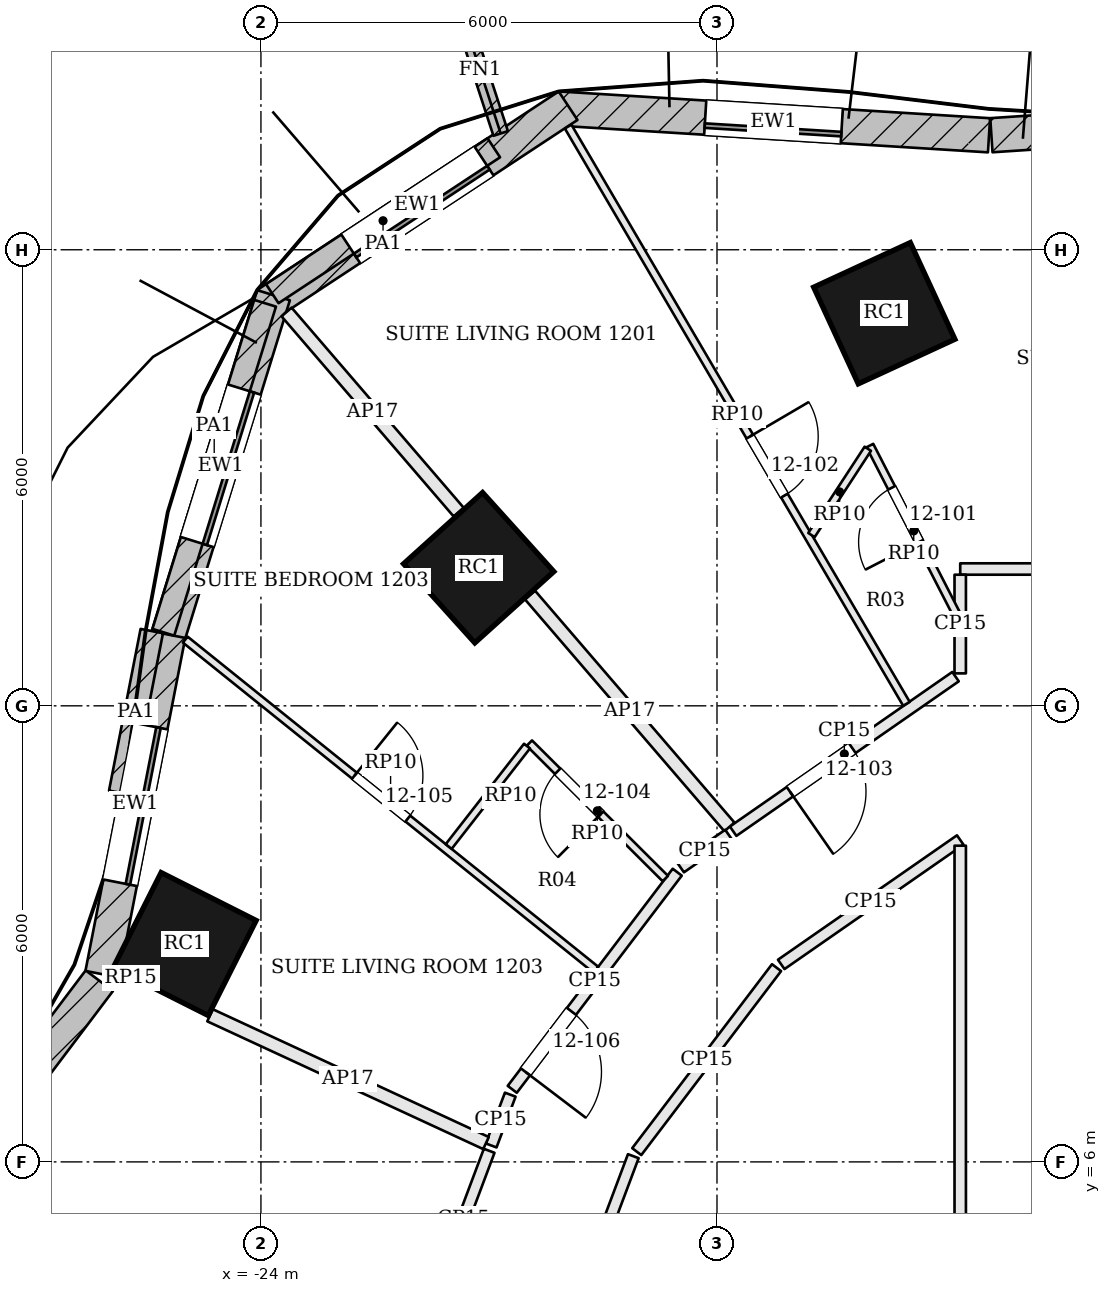
"""IFC4 building model, lengths in metres.
Left out: names, types, materials, properties, quantities, classifications, styles, units other than length and angle.
Written with IfcOpenShell. Run it as: python <this file> out.ifc"""

import sys

from ifc_helpers import new_model, si_unit, direction, frame, frame_2d, origin, origin_2d, place, context, subcontext, project, spatial, rectangle, extrude, element, fill, save


model = new_model("IFC4")
c1 = context("Model", 3, precision=1e-05, world=origin(), true_north=direction((0.0, 1.0)))
c2 = subcontext(c1, "Body", "Model", "MODEL_VIEW")
j1 = project(units=[si_unit("LENGTHUNIT", "METRE"), si_unit("PLANEANGLEUNIT", "RADIAN")], contexts=[c1])
p1 = place(None, origin())
s1 = spatial("IfcSite", under=j1, at=p1, CompositionType="ELEMENT")
p2 = place(p1, origin())
s2 = spatial("IfcBuilding", under=s1, at=p2, CompositionType="ELEMENT")
p3 = place(p2, frame((0.0, 0.0, 59.1)))
s3 = spatial("IfcBuildingStorey", under=s2, at=p3, CompositionType="ELEMENT", Elevation=59.1)
for number, where, z_axis, x_axis in (
    (1, (-15.799, 17.165, 0.0), (0.0, 0.0, 1.0), (-0.908, -0.419, 0.0)),
    (2, (-21.135, 13.817, 0.0), (0.0, 0.0, 1.0), (-0.743, -0.67, 0.0)),
    (3, (-25.003, 8.866, 0.0), (0.0, 0.0, 1.0), (-0.45, -0.893, 0.0)),
):
    element("IfcColumn", number, at=place(p3, frame(where, z_axis=z_axis, x_axis=x_axis)), inside=s3, PredefinedType="COLUMN", context=c2, shape_type="SweptSolid", body=[
        extrude(rectangle(XDim=1.4, YDim=1.4, at=origin_2d()), origin(), (0.0, 0.0, 1.0), 3.6),
    ])
p4 = place(p3, frame((-10.537, 19.761, 0.0), z_axis=(0.0, 0.0, 1.0), x_axis=(-0.997831357874, -0.065822346084, 0.0)))
e4 = element("IfcWall", 4, at=p4, inside=s3, PredefinedType="SOLIDWALL", context=c2, shape_type="SweptSolid", body=[
    extrude(rectangle(XDim=3.861, YDim=0.45, at=frame_2d((1.931, 0.0))), origin(), (0.0, 0.0, 1.0), 3.4),
])
p5 = place(p4, frame((0.881, 0.0, 0.9)))
e5 = element("IfcOpeningElement", 5, at=p5, cuts=e4, PredefinedType="OPENING", context=c2, shape_type="SweptSolid", body=[
    extrude(rectangle(XDim=2.1, YDim=2.0, at=frame_2d((1.05, 1.0))), frame((0.0, 0.235, 0.0), z_axis=(0.0, -1.0, 0.0), x_axis=(1.0, 0.0, 0.0)), (0.0, 0.0, 1.0), 0.47),
])
p6 = place(p3, frame((-14.421, 19.506, 0.0), z_axis=(0.0, 0.0, 1.0), x_axis=(-0.998078573447, 0.06196096534, 0.0)))
e6 = element("IfcWall", 6, at=p6, inside=s3, PredefinedType="SOLIDWALL", context=c2, shape_type="SweptSolid", body=[
    extrude(rectangle(XDim=5.682, YDim=0.45, at=frame_2d((2.841, 0.0))), origin(), (0.0, 0.0, 1.0), 3.4),
])
p7 = place(p6, frame((1.941, 0.0, 0.9)))
e7 = element("IfcOpeningElement", 7, at=p7, cuts=e6, PredefinedType="OPENING", context=c2, shape_type="SweptSolid", body=[
    extrude(rectangle(XDim=1.8, YDim=2.0, at=frame_2d((0.9, 1.0))), frame((0.0, 0.235, 0.0), z_axis=(0.0, -1.0, 0.0), x_axis=(1.0, 0.0, 0.0)), (0.0, 0.0, 1.0), 0.47),
])
p8 = place(p3, frame((-19.959, 19.895, 0.0), z_axis=(0.0, 0.0, 1.0), x_axis=(-0.835201398752, -0.549944200372, 0.0)))
e8 = element("IfcWall", 8, at=p8, inside=s3, PredefinedType="SOLIDWALL", context=c2, shape_type="SweptSolid", body=[
    extrude(rectangle(XDim=4.748, YDim=0.45, at=frame_2d((2.374, 0.0))), origin(), (0.0, 0.0, 1.0), 3.4),
])
p9 = place(p8, frame((1.324, 0.0, 0.9)))
e9 = element("IfcOpeningElement", 9, at=p9, cuts=e8, PredefinedType="OPENING", context=c2, shape_type="SweptSolid", body=[
    extrude(rectangle(XDim=2.1, YDim=2.0, at=frame_2d((1.05, 1.0))), frame((0.0, 0.235, 0.0), z_axis=(0.0, -1.0, 0.0), x_axis=(1.0, 0.0, 0.0)), (0.0, 0.0, 1.0), 0.47),
])
p10 = place(p3, frame((-23.834, 17.402, 0.0), z_axis=(0.0, 0.0, 1.0), x_axis=(-0.2954658114, -0.955353313855, 0.0)))
e10 = element("IfcWall", 10, at=p10, inside=s3, PredefinedType="SOLIDWALL", context=c2, shape_type="SweptSolid", body=[
    extrude(rectangle(XDim=4.698, YDim=0.45, at=frame_2d((2.349, 0.0))), origin(), (0.0, 0.0, 1.0), 3.4),
])
p11 = place(p10, frame((1.299, 0.0, 0.9)))
e11 = element("IfcOpeningElement", 11, at=p11, cuts=e10, PredefinedType="OPENING", context=c2, shape_type="SweptSolid", body=[
    extrude(rectangle(XDim=2.1, YDim=2.0, at=frame_2d((1.05, 1.0))), frame((0.0, 0.235, 0.0), z_axis=(0.0, -1.0, 0.0), x_axis=(1.0, 0.0, 0.0)), (0.0, 0.0, 1.0), 0.47),
])
p12 = place(p3, frame((-25.216, 12.936, 0.0), z_axis=(0.0, 0.0, 1.0), x_axis=(-0.191564556994, -0.981480015336, 0.0)))
e12 = element("IfcWall", 12, at=p12, inside=s3, PredefinedType="SOLIDWALL", context=c2, shape_type="SweptSolid", body=[
    extrude(rectangle(XDim=4.551, YDim=0.45, at=frame_2d((2.275, 0.0))), origin(), (0.0, 0.0, 1.0), 3.4),
])
p13 = place(p12, frame((1.226, 0.0, 0.9)))
e13 = element("IfcOpeningElement", 13, at=p13, cuts=e12, PredefinedType="OPENING", context=c2, shape_type="SweptSolid", body=[
    extrude(rectangle(XDim=2.1, YDim=2.0, at=frame_2d((1.05, 1.0))), frame((0.0, 0.235, 0.0), z_axis=(0.0, -1.0, 0.0), x_axis=(1.0, 0.0, 0.0)), (0.0, 0.0, 1.0), 0.47),
])
p14 = place(p3, frame((-26.126, 8.384, 0.0), z_axis=(0.0, 0.0, 1.0), x_axis=(-0.602408101465, -0.798188248028, 0.0)))
e14 = element("IfcWall", 14, at=p14, inside=s3, PredefinedType="SOLIDWALL", context=c2, shape_type="SweptSolid", body=[
    extrude(rectangle(XDim=4.909, YDim=0.45, at=frame_2d((2.455, 0.0))), origin(), (0.0, 0.0, 1.0), 3.4),
])
p15 = place(p14, frame((1.405, 0.0, 0.9)))
e15 = element("IfcOpeningElement", 15, at=p15, cuts=e14, PredefinedType="OPENING", context=c2, shape_type="SweptSolid", body=[
    extrude(rectangle(XDim=2.1, YDim=2.0, at=frame_2d((1.05, 1.0))), frame((0.0, 0.235, 0.0), z_axis=(0.0, -1.0, 0.0), x_axis=(1.0, 0.0, 0.0)), (0.0, 0.0, 1.0), 0.47),
])
p16 = place(p3, frame((-20.846, 19.53, 0.0), z_axis=(0.0, 0.0, 1.0), x_axis=(-0.309732726603, 0.950823662974, 0.0)))
e16 = element("IfcWall", 16, at=p16, inside=s3, PredefinedType="SOLIDWALL", context=c2, shape_type="SweptSolid", body=[
    extrude(rectangle(XDim=1.75, YDim=0.2, at=frame_2d((0.875, 0.0))), origin(), (0.0, 0.0, 1.0), 3.4),
])
p17 = place(p3, frame((-20.936, 19.342, 3.6), z_axis=(0.0, 0.0, 1.0), x_axis=(-0.835169297141, -0.549992950057, 0.0)))
e17 = element("IfcWall", 17, at=p17, inside=s3, PredefinedType="PARAPET", context=c2, shape_type="SweptSolid", body=[
    extrude(rectangle(XDim=3.49, YDim=0.3, at=frame_2d((1.745, 0.0))), origin(), (0.0, 0.0, 1.0), 1.1),
])
p18 = place(p3, frame((-23.945, 17.296, 3.6), z_axis=(0.0, 0.0, 1.0), x_axis=(-0.29546008929, -0.955355083535, 0.0)))
e18 = element("IfcWall", 18, at=p18, inside=s3, PredefinedType="PARAPET", context=c2, shape_type="SweptSolid", body=[
    extrude(rectangle(XDim=4.531, YDim=0.3, at=frame_2d((2.265, 0.0))), origin(), (0.0, 0.0, 1.0), 1.1),
])
p19 = place(p3, frame((-25.436, 12.983, 3.6), z_axis=(0.0, 0.0, 1.0), x_axis=(-0.191565926717, -0.981479747993, 0.0)))
e19 = element("IfcWall", 19, at=p19, inside=s3, PredefinedType="PARAPET", context=c2, shape_type="SweptSolid", body=[
    extrude(rectangle(XDim=2.168, YDim=0.3, at=frame_2d((1.084, 0.0))), origin(), (0.0, 0.0, 1.0), 1.1),
])
p20 = place(p3, frame((-11.464, 13.8, 0.0), z_axis=(0.0, 0.0, 1.0), x_axis=(-1.0, 0.0, 0.0)))
e20 = element("IfcWall", 20, at=p20, inside=s3, PredefinedType="PARTITIONING", context=c2, shape_type="SweptSolid", body=[
    extrude(rectangle(XDim=3.336, YDim=0.15, at=frame_2d((1.668, 0.0))), origin(), (0.0, 0.0, 1.0), 2.68),
])
p21 = place(p3, frame((-14.8, 13.725, 0.0), z_axis=(0.0, 0.0, 1.0), x_axis=(-0.000188040613, -0.99999998232, 0.0)))
e21 = element("IfcWall", 21, at=p21, inside=s3, PredefinedType="PARTITIONING", context=c2, shape_type="SweptSolid", body=[
    extrude(rectangle(XDim=1.298, YDim=0.15, at=frame_2d((0.649, 0.0))), origin(), (0.0, 0.0, 1.0), 2.68),
])
p22 = place(p3, frame((-14.862, 12.384, 0.0), z_axis=(0.0, 0.0, 1.0), x_axis=(-0.821152323197, -0.570709087108, 0.0)))
e22 = element("IfcWall", 22, at=p22, inside=s3, PredefinedType="PARTITIONING", context=c2, shape_type="SweptSolid", body=[
    extrude(rectangle(XDim=3.563, YDim=0.15, at=frame_2d((1.781, 0.0))), origin(), (0.0, 0.0, 1.0), 2.68),
])
p23 = place(p22, frame((1.652, 0.0, 0.0)))
e23 = element("IfcOpeningElement", 23, at=p23, cuts=e22, PredefinedType="OPENING", context=c2, shape_type="SweptSolid", body=[
    extrude(rectangle(XDim=1.0, YDim=2.1, at=frame_2d((0.5, 1.05))), frame((0.0, 0.085, 0.0), z_axis=(0.0, -1.0, 0.0), x_axis=(1.0, 0.0, 0.0)), (0.0, 0.0, 1.0), 0.17),
])
p24 = place(p3, frame((-23.663, 17.181, 0.0), z_axis=(0.0, 0.0, 1.0), x_axis=(0.652099088508, -0.758133747282, 0.0)))
e24 = element("IfcWall", 24, at=p24, inside=s3, PredefinedType="PARTITIONING", context=c2, shape_type="SweptSolid", body=[
    extrude(rectangle(XDim=3.472, YDim=0.175, at=frame_2d((1.736, 0.0))), origin(), (0.0, 0.0, 1.0), 2.68),
])
p25 = place(p3, frame((-20.459, 13.457, 0.0), z_axis=(0.0, 0.0, 1.0), x_axis=(0.652095095558, -0.758137181748, 0.0)))
e25 = element("IfcWall", 25, at=p25, inside=s3, PredefinedType="PARTITIONING", context=c2, shape_type="SweptSolid", body=[
    extrude(rectangle(XDim=4.022, YDim=0.175, at=frame_2d((2.011, 0.0))), origin(), (0.0, 0.0, 1.0), 2.68),
])
p26 = place(p3, frame((-17.849, 10.308, 0.0), z_axis=(0.0, 0.0, 1.0), x_axis=(-0.821191323677, -0.570652968027, 0.0)))
e26 = element("IfcWall", 26, at=p26, inside=s3, PredefinedType="PARTITIONING", context=c2, shape_type="SweptSolid", body=[
    extrude(rectangle(XDim=0.765, YDim=0.15, at=frame_2d((0.382, 0.0))), origin(), (0.0, 0.0, 1.0), 2.68),
])
p27 = place(p3, frame((-18.523, 9.811, 0.0), z_axis=(0.0, 0.0, 1.0), x_axis=(-0.605040130963, -0.796194976073, 0.0)))
e27 = element("IfcWall", 27, at=p27, inside=s3, PredefinedType="PARTITIONING", context=c2, shape_type="SweptSolid", body=[
    extrude(rectangle(XDim=3.588, YDim=0.15, at=frame_2d((1.794, 0.0))), origin(), (0.0, 0.0, 1.0), 2.68),
])
p28 = place(p27, frame((2.3, 0.0, 0.0)))
e28 = element("IfcOpeningElement", 28, at=p28, cuts=e27, PredefinedType="OPENING", context=c2, shape_type="SweptSolid", body=[
    extrude(rectangle(XDim=1.0, YDim=2.1, at=frame_2d((0.5, 1.05))), frame((0.0, 0.085, 0.0), z_axis=(0.0, -1.0, 0.0), x_axis=(1.0, 0.0, 0.0)), (0.0, 0.0, 1.0), 0.17),
])
p29 = place(p3, frame((-20.72, 6.885, 0.0), z_axis=(0.0, 0.0, 1.0), x_axis=(-0.351610674972, -0.936146320425, 0.0)))
e29 = element("IfcWall", 29, at=p29, inside=s3, PredefinedType="PARTITIONING", context=c2, shape_type="SweptSolid", body=[
    extrude(rectangle(XDim=0.714, YDim=0.15, at=frame_2d((0.357, 0.0))), origin(), (0.0, 0.0, 1.0), 2.68),
])
p30 = place(p3, frame((-25.857, 8.479, 0.0), z_axis=(0.0, 0.0, 1.0), x_axis=(0.907339741323, -0.420398137265, 0.0)))
e30 = element("IfcWall", 30, at=p30, inside=s3, PredefinedType="PARTITIONING", context=c2, shape_type="SweptSolid", body=[
    extrude(rectangle(XDim=0.312, YDim=0.15, at=frame_2d((0.156, 0.0))), origin(), (0.0, 0.0, 1.0), 3.4),
])
p31 = place(p3, frame((-24.669, 7.929, 0.0), z_axis=(0.0, 0.0, 1.0), x_axis=(0.907438898331, -0.420184061807, 0.0)))
e31 = element("IfcWall", 31, at=p31, inside=s3, PredefinedType="PARTITIONING", context=c2, shape_type="SweptSolid", body=[
    extrude(rectangle(XDim=4.0, YDim=0.175, at=frame_2d((2.0, 0.0))), origin(), (0.0, 0.0, 1.0), 2.68),
])
p32 = place(p3, frame((-20.997, 6.146, 0.0), z_axis=(0.0, 0.0, 1.0), x_axis=(-0.35150189194, -0.936187171437, 0.0)))
e32 = element("IfcWall", 32, at=p32, inside=s3, PredefinedType="PARTITIONING", context=c2, shape_type="SweptSolid", body=[
    extrude(rectangle(XDim=1.909, YDim=0.15, at=frame_2d((0.954, 0.0))), origin(), (0.0, 0.0, 1.0), 2.68),
])
p33 = place(p3, frame((-19.884, 3.99, 0.0), z_axis=(0.0, 0.0, 1.0), x_axis=(0.351423736928, 0.936216511884, 0.0)))
e33 = element("IfcWall", 33, at=p33, inside=s3, PredefinedType="PARTITIONING", context=c2, shape_type="SweptSolid", body=[
    extrude(rectangle(XDim=2.227, YDim=0.15, at=frame_2d((1.114, 0.0))), origin(), (0.0, 0.0, 1.0), 2.68),
])
p34 = place(p3, frame((-19.056, 6.135, 0.0), z_axis=(0.0, 0.0, 1.0), x_axis=(0.604999774258, 0.796225642107, 0.0)))
e34 = element("IfcWall", 34, at=p34, inside=s3, PredefinedType="PARTITIONING", context=c2, shape_type="SweptSolid", body=[
    extrude(rectangle(XDim=3.04, YDim=0.15, at=frame_2d((1.52, 0.0))), origin(), (0.0, 0.0, 1.0), 2.68),
])
p35 = place(p3, frame((-17.155, 8.598, 0.0), z_axis=(0.0, 0.0, 1.0), x_axis=(0.821087350938, 0.570802559673, 0.0)))
e35 = element("IfcWall", 35, at=p35, inside=s3, PredefinedType="PARTITIONING", context=c2, shape_type="SweptSolid", body=[
    extrude(rectangle(XDim=2.868, YDim=0.15, at=frame_2d((1.434, 0.0))), origin(), (0.0, 0.0, 1.0), 2.68),
])
p36 = place(p3, frame((-14.8, 10.16, 0.0), z_axis=(0.0, 0.0, 1.0), x_axis=(0.0, -1.0, 0.0)))
e36 = element("IfcWall", 36, at=p36, inside=s3, PredefinedType="PARTITIONING", context=c2, shape_type="SweptSolid", body=[
    extrude(rectangle(XDim=14.96, YDim=0.15, at=frame_2d((7.48, 0.0))), origin(), (0.0, 0.0, 1.0), 2.68),
])
p37 = place(p36, frame((6.542, 0.0, 0.0)))
e37 = element("IfcOpeningElement", 37, at=p37, cuts=e36, PredefinedType="OPENING", context=c2, shape_type="SweptSolid", body=[
    extrude(rectangle(XDim=1.8, YDim=2.1, at=frame_2d((0.9, 1.05))), frame((0.0, 0.085, 0.0), z_axis=(0.0, -1.0, 0.0), x_axis=(1.0, 0.0, 0.0)), (0.0, 0.0, 1.0), 0.17),
])
p38 = place(p3, frame((-19.958, 19.62, 0.0), z_axis=(0.0, 0.0, 1.0), x_axis=(0.505625538269, -0.862753044069, 0.0)))
e38 = element("IfcWall", 38, at=p38, inside=s3, PredefinedType="PARTITIONING", context=c2, shape_type="SweptSolid", body=[
    extrude(rectangle(XDim=8.802, YDim=0.1, at=frame_2d((4.401, 0.0))), origin(), (0.0, 0.0, 1.0), 2.898),
])
p39 = place(p38, frame((4.727, 0.0, 0.0)))
e39 = element("IfcOpeningElement", 39, at=p39, cuts=e38, PredefinedType="OPENING", context=c2, shape_type="SweptSolid", body=[
    extrude(rectangle(XDim=0.9, YDim=2.4, at=frame_2d((0.45, 1.2))), frame((0.0, 0.06, 0.0), z_axis=(0.0, -1.0, 0.0), x_axis=(1.0, 0.0, 0.0)), (0.0, 0.0, 1.0), 0.12),
])
p40 = place(p3, frame((-14.834, 13.178, 0.0), z_axis=(0.0, 0.0, 1.0), x_axis=(-0.457048681662, 0.889441680264, 0.0)))
e40 = element("IfcWall", 40, at=p40, inside=s3, PredefinedType="PARTITIONING", context=c2, shape_type="SweptSolid", body=[
    extrude(rectangle(XDim=2.525, YDim=0.1, at=frame_2d((1.262, 0.0))), origin(), (0.0, 0.0, 1.0), 2.898),
])
p41 = place(p40, frame((1.1, 0.0, 0.0)))
e41 = element("IfcOpeningElement", 41, at=p41, cuts=e40, PredefinedType="OPENING", context=c2, shape_type="SweptSolid", body=[
    extrude(rectangle(XDim=0.8, YDim=2.1, at=frame_2d((0.4, 1.05))), frame((0.0, 0.06, 0.0), z_axis=(0.0, -1.0, 0.0), x_axis=(1.0, 0.0, 0.0)), (0.0, 0.0, 1.0), 0.12),
])
p42 = place(p3, frame((-16.016, 15.382, 0.0), z_axis=(0.0, 0.0, 1.0), x_axis=(-0.546613733712, -0.837384873351, 0.0)))
e42 = element("IfcWall", 42, at=p42, inside=s3, PredefinedType="PARTITIONING", context=c2, shape_type="SweptSolid", body=[
    extrude(rectangle(XDim=1.356, YDim=0.1, at=frame_2d((0.678, 0.0))), origin(), (0.0, 0.0, 1.0), 2.898),
])
p43 = place(p3, frame((-24.996, 12.871, 0.0), z_axis=(0.0, 0.0, 1.0), x_axis=(0.779371961482, -0.626561525835, 0.0)))
e43 = element("IfcWall", 43, at=p43, inside=s3, PredefinedType="PARTITIONING", context=c2, shape_type="SweptSolid", body=[
    extrude(rectangle(XDim=6.932, YDim=0.1, at=frame_2d((3.466, 0.0))), origin(), (0.0, 0.0, 1.0), 2.898),
])
p44 = place(p43, frame((2.857, 0.0, 0.0)))
e44 = element("IfcOpeningElement", 44, at=p44, cuts=e43, PredefinedType="OPENING", context=c2, shape_type="SweptSolid", body=[
    extrude(rectangle(XDim=0.9, YDim=2.4, at=frame_2d((0.45, 1.2))), frame((0.0, 0.06, 0.0), z_axis=(0.0, -1.0, 0.0), x_axis=(1.0, 0.0, 0.0)), (0.0, 0.0, 1.0), 0.12),
])
p45 = place(p3, frame((-18.68, 9.728, 0.0), z_axis=(0.0, 0.0, 1.0), x_axis=(-0.708458982763, 0.705751988833, 0.0)))
e45 = element("IfcWall", 45, at=p45, inside=s3, PredefinedType="PARTITIONING", context=c2, shape_type="SweptSolid", body=[
    extrude(rectangle(XDim=2.525, YDim=0.1, at=frame_2d((1.263, 0.0))), origin(), (0.0, 0.0, 1.0), 2.898),
])
p46 = place(p45, frame((1.2, 0.0, 0.0)))
e46 = element("IfcOpeningElement", 46, at=p46, cuts=e45, PredefinedType="OPENING", context=c2, shape_type="SweptSolid", body=[
    extrude(rectangle(XDim=0.8, YDim=2.1, at=frame_2d((0.4, 1.05))), frame((0.0, 0.06, 0.0), z_axis=(0.0, -1.0, 0.0), x_axis=(1.0, 0.0, 0.0)), (0.0, 0.0, 1.0), 0.12),
])
p47 = place(p3, frame((-20.5, 11.47, 0.0), z_axis=(0.0, 0.0, 1.0), x_axis=(-0.614837929168, -0.788653485921, 0.0)))
e47 = element("IfcWall", 47, at=p47, inside=s3, PredefinedType="PARTITIONING", context=c2, shape_type="SweptSolid", body=[
    extrude(rectangle(XDim=1.676, YDim=0.1, at=frame_2d((0.838, 0.0))), origin(), (0.0, 0.0, 1.0), 2.898),
])
p48 = place(p7, origin())
e48 = element("IfcWindow", 48, at=p48, inside=s3, PartitioningType="SINGLE_PANEL", PredefinedType="WINDOW", context=c2, shape_type="SweptSolid", body=[
    extrude(rectangle(XDim=1.8, YDim=2.0, at=frame_2d((0.9, 1.0))), frame((0.0, 0.135, 0.0), z_axis=(0.0, -1.0, 0.0), x_axis=(1.0, 0.0, 0.0)), (0.0, 0.0, 1.0), 0.06),
])
fill(e7, e48)
p49 = place(p9, origin())
e49 = element("IfcWindow", 49, at=p49, inside=s3, PartitioningType="SINGLE_PANEL", PredefinedType="WINDOW", context=c2, shape_type="SweptSolid", body=[
    extrude(rectangle(XDim=2.1, YDim=2.0, at=frame_2d((1.05, 1.0))), frame((0.0, 0.135, 0.0), z_axis=(0.0, -1.0, 0.0), x_axis=(1.0, 0.0, 0.0)), (0.0, 0.0, 1.0), 0.06),
])
fill(e9, e49)
p50 = place(p11, origin())
e50 = element("IfcWindow", 50, at=p50, inside=s3, PartitioningType="SINGLE_PANEL", PredefinedType="WINDOW", context=c2, shape_type="SweptSolid", body=[
    extrude(rectangle(XDim=2.1, YDim=2.0, at=frame_2d((1.05, 1.0))), frame((0.0, 0.135, 0.0), z_axis=(0.0, -1.0, 0.0), x_axis=(1.0, 0.0, 0.0)), (0.0, 0.0, 1.0), 0.06),
])
fill(e11, e50)
p51 = place(p13, origin())
e51 = element("IfcWindow", 51, at=p51, inside=s3, PartitioningType="SINGLE_PANEL", PredefinedType="WINDOW", context=c2, shape_type="SweptSolid", body=[
    extrude(rectangle(XDim=2.1, YDim=2.0, at=frame_2d((1.05, 1.0))), frame((0.0, 0.135, 0.0), z_axis=(0.0, -1.0, 0.0), x_axis=(1.0, 0.0, 0.0)), (0.0, 0.0, 1.0), 0.06),
])
fill(e13, e51)
p52 = place(p41, origin())
e52 = element("IfcDoor", 52, at=p52, inside=s3, OperationType="SINGLE_SWING_LEFT", PredefinedType="DOOR", context=c2, shape_type="SweptSolid", body=[
    extrude(rectangle(XDim=0.8, YDim=2.1, at=frame_2d((0.4, 1.05))), frame((0.0, 0.025, 0.0), z_axis=(0.0, -1.0, 0.0), x_axis=(1.0, 0.0, 0.0)), (0.0, 0.0, 1.0), 0.05),
])
fill(e41, e52)
p53 = place(p39, origin())
e53 = element("IfcDoor", 53, at=p53, inside=s3, OperationType="SINGLE_SWING_LEFT", PredefinedType="DOOR", context=c2, shape_type="SweptSolid", body=[
    extrude(rectangle(XDim=0.9, YDim=2.4, at=frame_2d((0.45, 1.2))), frame((0.0, 0.025, 0.0), z_axis=(0.0, -1.0, 0.0), x_axis=(1.0, 0.0, 0.0)), (0.0, 0.0, 1.0), 0.05),
])
fill(e39, e53)
p54 = place(p23, origin())
e54 = element("IfcDoor", 54, at=p54, inside=s3, OperationType="SINGLE_SWING_RIGHT", PredefinedType="DOOR", context=c2, shape_type="SweptSolid", body=[
    extrude(rectangle(XDim=1.0, YDim=2.1, at=frame_2d((0.5, 1.05))), frame((0.0, 0.025, 0.0), z_axis=(0.0, -1.0, 0.0), x_axis=(1.0, 0.0, 0.0)), (0.0, 0.0, 1.0), 0.05),
])
fill(e23, e54)
p55 = place(p46, origin())
e55 = element("IfcDoor", 55, at=p55, inside=s3, OperationType="SINGLE_SWING_LEFT", PredefinedType="DOOR", context=c2, shape_type="SweptSolid", body=[
    extrude(rectangle(XDim=0.8, YDim=2.1, at=frame_2d((0.4, 1.05))), frame((0.0, 0.025, 0.0), z_axis=(0.0, -1.0, 0.0), x_axis=(1.0, 0.0, 0.0)), (0.0, 0.0, 1.0), 0.05),
])
fill(e46, e55)
p56 = place(p44, origin())
e56 = element("IfcDoor", 56, at=p56, inside=s3, OperationType="SINGLE_SWING_LEFT", PredefinedType="DOOR", context=c2, shape_type="SweptSolid", body=[
    extrude(rectangle(XDim=0.9, YDim=2.4, at=frame_2d((0.45, 1.2))), frame((0.0, 0.025, 0.0), z_axis=(0.0, -1.0, 0.0), x_axis=(1.0, 0.0, 0.0)), (0.0, 0.0, 1.0), 0.05),
])
fill(e44, e56)
p57 = place(p28, origin())
e57 = element("IfcDoor", 57, at=p57, inside=s3, OperationType="SINGLE_SWING_RIGHT", PredefinedType="DOOR", context=c2, shape_type="SweptSolid", body=[
    extrude(rectangle(XDim=1.0, YDim=2.1, at=frame_2d((0.5, 1.05))), frame((0.0, 0.025, 0.0), z_axis=(0.0, -1.0, 0.0), x_axis=(1.0, 0.0, 0.0)), (0.0, 0.0, 1.0), 0.05),
])
fill(e28, e57)
save(model, sys.argv[1])
